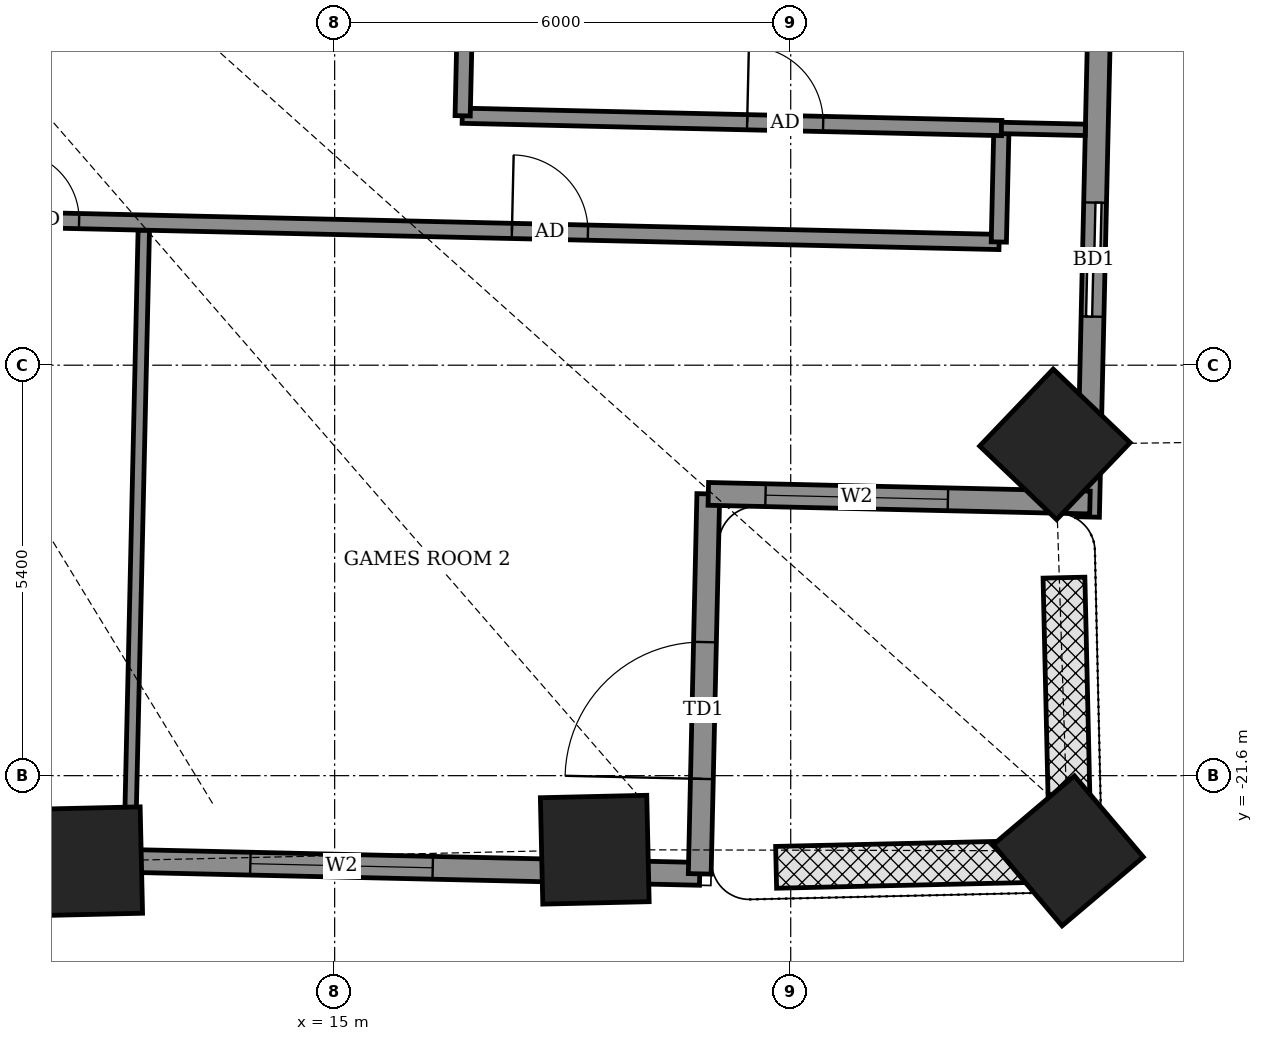
"""IFC4 building model, lengths in metres.
Left out: names, types, materials, properties, quantities, classifications, styles, units other than length and angle.
Written with IfcOpenShell. Run it as: python <this file> out.ifc"""

import sys

from ifc_helpers import new_model, si_unit, direction, frame, frame_2d, origin, origin_2d, place, context, subcontext, project, spatial, rectangle, extrude, element, fill, save


model = new_model("IFC4")
c1 = context("Model", 3, precision=1e-05, world=origin(), true_north=direction((0.0, 1.0)))
c2 = subcontext(c1, "Body", "Model", "MODEL_VIEW")
j1 = project(units=[si_unit("LENGTHUNIT", "METRE"), si_unit("PLANEANGLEUNIT", "RADIAN")], contexts=[c1])
p1 = place(None, origin())
s1 = spatial("IfcSite", under=j1, at=p1, CompositionType="ELEMENT")
p2 = place(p1, origin())
s2 = spatial("IfcBuilding", under=s1, at=p2, CompositionType="ELEMENT")
p3 = place(p2, frame((0.0, 0.0, 97.3)))
s3 = spatial("IfcBuildingStorey", under=s2, at=p3, CompositionType="ELEMENT", Elevation=97.3)
for number, where, z_axis, x_axis in (
    (1, (11.757, -22.726, -0.55), (0.0, 0.0, 1.0), (1.0, 0.023, 0.0)),
    (2, (18.422, -22.574, -0.55), (0.0, 0.0, 1.0), (1.0, 0.023, 0.0)),
    (3, (24.651, -22.589, -0.55), (0.0, 0.0, 1.0), (0.763, 0.647, 0.0)),
    (4, (24.476, -17.241, -0.55), (0.0, 0.0, 1.0), (0.691, 0.723, 0.0)),
):
    element("IfcColumn", number, at=place(p3, frame(where, z_axis=z_axis, x_axis=x_axis)), inside=s3, PredefinedType="COLUMN", context=c2, shape_type="SweptSolid", body=[
        extrude(rectangle(XDim=1.4, YDim=1.4, at=origin_2d()), origin(), (0.0, 0.0, 1.0), 4.6),
    ])
p4 = place(p3, frame((24.911, -18.197, 0.0), z_axis=(0.0, 0.0, 1.0), x_axis=(0.022624958127, 0.999744022873, 0.0)))
e5 = element("IfcWall", 5, at=p4, inside=s3, PredefinedType="SOLIDWALL", context=c2, shape_type="SweptSolid", body=[
    extrude(rectangle(XDim=12.42, YDim=0.3, at=frame_2d((6.21, 0.0))), origin(), (0.0, 0.0, 1.0), 2.85),
])
p5 = place(p4, frame((2.637, 0.0, 0.0)))
e6 = element("IfcOpeningElement", 6, at=p5, cuts=e5, PredefinedType="OPENING", context=c2, shape_type="SweptSolid", body=[
    extrude(rectangle(XDim=1.5, YDim=2.4, at=frame_2d((0.75, 1.2))), frame((0.0, 0.16, 0.0), z_axis=(0.0, -1.0, 0.0), x_axis=(1.0, 0.0, 0.0)), (0.0, 0.0, 1.0), 0.32),
])
p6 = place(p4, frame((6.411, 0.0, 0.9)))
e7 = element("IfcOpeningElement", 7, at=p6, cuts=e5, PredefinedType="OPENING", context=c2, shape_type="SweptSolid", body=[
    extrude(rectangle(XDim=2.4, YDim=1.5, at=frame_2d((1.2, 0.75))), frame((0.0, 0.16, 0.0), z_axis=(0.0, -1.0, 0.0), x_axis=(1.0, 0.0, 0.0)), (0.0, 0.0, 1.0), 0.32),
])
p7 = place(p3, frame((-24.894, -21.878, 0.0), z_axis=(0.0, 0.0, 1.0), x_axis=(0.999742689045, -0.022683820265, 0.0)))
e8 = element("IfcWall", 8, at=p7, inside=s3, PredefinedType="SOLIDWALL", context=c2, shape_type="SweptSolid", body=[
    extrude(rectangle(XDim=44.708, YDim=0.3, at=frame_2d((22.354, 0.0))), origin(), (0.0, 0.0, 1.0), 2.45),
])
p8 = place(p7, frame((0.698, 0.0, 0.0)))
e9 = element("IfcOpeningElement", 9, at=p8, cuts=e8, PredefinedType="OPENING", context=c2, shape_type="SweptSolid", body=[
    extrude(rectangle(XDim=1.5, YDim=2.4, at=frame_2d((0.75, 1.2))), frame((0.0, 0.16, 0.0), z_axis=(0.0, -1.0, 0.0), x_axis=(1.0, 0.0, 0.0)), (0.0, 0.0, 1.0), 0.32),
])
p9 = place(p7, frame((6.543, 0.0, 0.9)))
e10 = element("IfcOpeningElement", 10, at=p9, cuts=e8, PredefinedType="OPENING", context=c2, shape_type="SweptSolid", body=[
    extrude(rectangle(XDim=2.4, YDim=1.5, at=frame_2d((1.2, 0.75))), frame((0.0, 0.16, 0.0), z_axis=(0.0, -1.0, 0.0), x_axis=(1.0, 0.0, 0.0)), (0.0, 0.0, 1.0), 0.32),
])
p10 = place(p7, frame((18.48, 0.0, 0.9)))
e11 = element("IfcOpeningElement", 11, at=p10, cuts=e8, PredefinedType="OPENING", context=c2, shape_type="SweptSolid", body=[
    extrude(rectangle(XDim=2.4, YDim=1.5, at=frame_2d((1.2, 0.75))), frame((0.0, 0.16, 0.0), z_axis=(0.0, -1.0, 0.0), x_axis=(1.0, 0.0, 0.0)), (0.0, 0.0, 1.0), 0.32),
])
p11 = place(p7, frame((24.76, 0.0, 0.0)))
e12 = element("IfcOpeningElement", 12, at=p11, cuts=e8, PredefinedType="OPENING", context=c2, shape_type="SweptSolid", body=[
    extrude(rectangle(XDim=1.5, YDim=2.4, at=frame_2d((0.75, 1.2))), frame((0.0, 0.16, 0.0), z_axis=(0.0, -1.0, 0.0), x_axis=(1.0, 0.0, 0.0)), (0.0, 0.0, 1.0), 0.32),
])
p12 = place(p7, frame((27.61, 0.0, 0.0)))
e13 = element("IfcOpeningElement", 13, at=p12, cuts=e8, PredefinedType="OPENING", context=c2, shape_type="SweptSolid", body=[
    extrude(rectangle(XDim=1.5, YDim=2.4, at=frame_2d((0.75, 1.2))), frame((0.0, 0.16, 0.0), z_axis=(0.0, -1.0, 0.0), x_axis=(1.0, 0.0, 0.0)), (0.0, 0.0, 1.0), 0.32),
])
p13 = place(p7, frame((33.44, 0.0, 0.0)))
e14 = element("IfcOpeningElement", 14, at=p13, cuts=e8, PredefinedType="OPENING", context=c2, shape_type="SweptSolid", body=[
    extrude(rectangle(XDim=1.5, YDim=2.4, at=frame_2d((0.75, 1.2))), frame((0.0, 0.16, 0.0), z_axis=(0.0, -1.0, 0.0), x_axis=(1.0, 0.0, 0.0)), (0.0, 0.0, 1.0), 0.32),
])
p14 = place(p7, frame((38.795, 0.0, 0.9)))
e15 = element("IfcOpeningElement", 15, at=p14, cuts=e8, PredefinedType="OPENING", context=c2, shape_type="SweptSolid", body=[
    extrude(rectangle(XDim=2.4, YDim=1.5, at=frame_2d((1.2, 0.75))), frame((0.0, 0.16, 0.0), z_axis=(0.0, -1.0, 0.0), x_axis=(1.0, 0.0, 0.0)), (0.0, 0.0, 1.0), 0.32),
])
p15 = place(p3, frame((19.803, -22.892, 0.0), z_axis=(0.0, 0.0, 1.0), x_axis=(0.022606059803, 0.999744450377, 0.0)))
e16 = element("IfcWall", 16, at=p15, inside=s3, PredefinedType="SOLIDWALL", context=c2, shape_type="SweptSolid", body=[
    extrude(rectangle(XDim=5.0, YDim=0.3, at=frame_2d((2.5, 0.0))), origin(), (0.0, 0.0, 1.0), 2.45),
])
p16 = place(p15, frame((1.25, 0.0, 0.0)))
e17 = element("IfcOpeningElement", 17, at=p16, cuts=e16, PredefinedType="OPENING", context=c2, shape_type="SweptSolid", body=[
    extrude(rectangle(XDim=1.8, YDim=2.4, at=frame_2d((0.9, 1.2))), frame((0.0, 0.16, 0.0), z_axis=(0.0, -1.0, 0.0), x_axis=(1.0, 0.0, 0.0)), (0.0, 0.0, 1.0), 0.32),
])
p17 = place(p3, frame((19.916, -17.893, 0.0), z_axis=(0.0, 0.0, 1.0), x_axis=(0.99974228708, -0.022701529129, 0.0)))
e18 = element("IfcWall", 18, at=p17, inside=s3, PredefinedType="SOLIDWALL", context=c2, shape_type="SweptSolid", body=[
    extrude(rectangle(XDim=5.022, YDim=0.3, at=frame_2d((2.511, 0.0))), origin(), (0.0, 0.0, 1.0), 2.45),
])
p18 = place(p17, frame((0.753, 0.0, 0.9)))
e19 = element("IfcOpeningElement", 19, at=p18, cuts=e18, PredefinedType="OPENING", context=c2, shape_type="SweptSolid", body=[
    extrude(rectangle(XDim=2.4, YDim=1.5, at=frame_2d((1.2, 0.75))), frame((0.0, 0.16, 0.0), z_axis=(0.0, -1.0, 0.0), x_axis=(1.0, 0.0, 0.0)), (0.0, 0.0, 1.0), 0.32),
])
p19 = place(p3, frame((24.595, -18.995, 0.0), z_axis=(0.0, 0.0, 1.0), x_axis=(0.022790544321, -0.999740261813, 0.0)))
e20 = element("IfcWall", 20, at=p19, inside=s3, PredefinedType="USERDEFINED", context=c2, shape_type="SweptSolid", body=[
    extrude(rectangle(XDim=3.289, YDim=0.55, at=frame_2d((1.644, 0.0))), origin(), (0.0, 0.0, 1.0), 0.8),
])
p20 = place(p3, frame((24.245, -22.728, 0.0), z_axis=(0.0, 0.0, 1.0), x_axis=(-0.99974337306, -0.022653653644, 0.0)))
e21 = element("IfcWall", 21, at=p20, inside=s3, PredefinedType="USERDEFINED", context=c2, shape_type="SweptSolid", body=[
    extrude(rectangle(XDim=3.438, YDim=0.55, at=frame_2d((1.719, 0.0))), origin(), (0.0, 0.0, 1.0), 0.8),
])
p21 = place(p3, frame((12.304, -22.572, 0.0), z_axis=(0.0, 0.0, 1.0), x_axis=(0.022706435224, 0.999742175663, 0.0)))
e22 = element("IfcWall", 22, at=p21, inside=s3, PredefinedType="PARTITIONING", context=c2, shape_type="SweptSolid", body=[
    extrude(rectangle(XDim=8.15, YDim=0.15, at=frame_2d((4.075, 0.0))), origin(), (0.0, 0.0, 1.0), 2.65),
])
p22 = place(p3, frame((-24.332, -13.488, 0.0), z_axis=(0.0, 0.0, 1.0), x_axis=(0.999742555853, -0.022689689667, 0.0)))
e23 = element("IfcWall", 23, at=p22, inside=s3, PredefinedType="PARTITIONING", context=c2, shape_type="SweptSolid", body=[
    extrude(rectangle(XDim=48.086, YDim=0.2, at=frame_2d((24.043, 0.0))), origin(), (0.0, 0.0, 1.0), 2.45),
])
p23 = place(p22, frame((0.2, 0.0, 0.0)))
e24 = element("IfcOpeningElement", 24, at=p23, cuts=e23, PredefinedType="OPENING", context=c2, shape_type="SweptSolid", body=[
    extrude(rectangle(XDim=1.0, YDim=2.1, at=frame_2d((0.5, 1.05))), frame((0.0, 0.11, 0.0), z_axis=(0.0, -1.0, 0.0), x_axis=(1.0, 0.0, 0.0)), (0.0, 0.0, 1.0), 0.22),
])
p24 = place(p22, frame((3.879, 0.0, 0.0)))
e25 = element("IfcOpeningElement", 25, at=p24, cuts=e23, PredefinedType="OPENING", context=c2, shape_type="SweptSolid", body=[
    extrude(rectangle(XDim=0.9, YDim=2.1, at=frame_2d((0.45, 1.05))), frame((0.0, 0.11, 0.0), z_axis=(0.0, -1.0, 0.0), x_axis=(1.0, 0.0, 0.0)), (0.0, 0.0, 1.0), 0.22),
])
p25 = place(p22, frame((8.929, 0.0, 0.0)))
e26 = element("IfcOpeningElement", 26, at=p25, cuts=e23, PredefinedType="OPENING", context=c2, shape_type="SweptSolid", body=[
    extrude(rectangle(XDim=1.0, YDim=2.1, at=frame_2d((0.5, 1.05))), frame((0.0, 0.11, 0.0), z_axis=(0.0, -1.0, 0.0), x_axis=(1.0, 0.0, 0.0)), (0.0, 0.0, 1.0), 0.22),
])
p26 = place(p22, frame((17.004, 0.0, 0.0)))
e27 = element("IfcOpeningElement", 27, at=p26, cuts=e23, PredefinedType="OPENING", context=c2, shape_type="SweptSolid", body=[
    extrude(rectangle(XDim=1.0, YDim=2.1, at=frame_2d((0.5, 1.05))), frame((0.0, 0.11, 0.0), z_axis=(0.0, -1.0, 0.0), x_axis=(1.0, 0.0, 0.0)), (0.0, 0.0, 1.0), 0.22),
])
p27 = place(p22, frame((25.054, 0.0, 0.0)))
e28 = element("IfcOpeningElement", 28, at=p27, cuts=e23, PredefinedType="OPENING", context=c2, shape_type="SweptSolid", body=[
    extrude(rectangle(XDim=0.9, YDim=2.1, at=frame_2d((0.45, 1.05))), frame((0.0, 0.11, 0.0), z_axis=(0.0, -1.0, 0.0), x_axis=(1.0, 0.0, 0.0)), (0.0, 0.0, 1.0), 0.22),
])
p28 = place(p22, frame((27.679, 0.0, 0.0)))
e29 = element("IfcOpeningElement", 29, at=p28, cuts=e23, PredefinedType="OPENING", context=c2, shape_type="SweptSolid", body=[
    extrude(rectangle(XDim=0.9, YDim=2.1, at=frame_2d((0.45, 1.05))), frame((0.0, 0.11, 0.0), z_axis=(0.0, -1.0, 0.0), x_axis=(1.0, 0.0, 0.0)), (0.0, 0.0, 1.0), 0.22),
])
p29 = place(p22, frame((35.079, 0.0, 0.0)))
e30 = element("IfcOpeningElement", 30, at=p29, cuts=e23, PredefinedType="OPENING", context=c2, shape_type="SweptSolid", body=[
    extrude(rectangle(XDim=0.9, YDim=2.1, at=frame_2d((0.45, 1.05))), frame((0.0, 0.11, 0.0), z_axis=(0.0, -1.0, 0.0), x_axis=(1.0, 0.0, 0.0)), (0.0, 0.0, 1.0), 0.22),
])
p30 = place(p22, frame((41.675, 0.0, 0.0)))
e31 = element("IfcOpeningElement", 31, at=p30, cuts=e23, PredefinedType="OPENING", context=c2, shape_type="SweptSolid", body=[
    extrude(rectangle(XDim=1.0, YDim=2.1, at=frame_2d((0.5, 1.05))), frame((0.0, 0.11, 0.0), z_axis=(0.0, -1.0, 0.0), x_axis=(1.0, 0.0, 0.0)), (0.0, 0.0, 1.0), 0.22),
])
p31 = place(p3, frame((23.738, -14.579, 0.0), z_axis=(0.0, 0.0, 1.0), x_axis=(0.022617910375, 0.999744182344, 0.0)))
e32 = element("IfcWall", 32, at=p31, inside=s3, PredefinedType="PARTITIONING", context=c2, shape_type="SweptSolid", body=[
    extrude(rectangle(XDim=1.5, YDim=0.2, at=frame_2d((0.75, 0.0))), origin(), (0.0, 0.0, 1.0), 4.05),
])
p32 = place(p3, frame((16.679, -12.918, 0.0), z_axis=(0.0, 0.0, 1.0), x_axis=(0.999739218926, -0.02283624622, 0.0)))
e33 = element("IfcWall", 33, at=p32, inside=s3, PredefinedType="PARTITIONING", context=c2, shape_type="SweptSolid", body=[
    extrude(rectangle(XDim=7.099, YDim=0.2, at=frame_2d((3.549, 0.0))), origin(), (0.0, 0.0, 1.0), 4.05),
])
p33 = place(p32, frame((3.749, 0.0, 0.0)))
e34 = element("IfcOpeningElement", 34, at=p33, cuts=e33, PredefinedType="OPENING", context=c2, shape_type="SweptSolid", body=[
    extrude(rectangle(XDim=1.0, YDim=2.1, at=frame_2d((0.5, 1.05))), frame((0.0, 0.11, 0.0), z_axis=(0.0, -1.0, 0.0), x_axis=(1.0, 0.0, 0.0)), (0.0, 0.0, 1.0), 0.22),
])
p34 = place(p3, frame((16.684, -12.919, 0.0), z_axis=(0.0, 0.0, 1.0), x_axis=(0.022667483124, 0.999743059595, 0.0)))
e35 = element("IfcWall", 35, at=p34, inside=s3, PredefinedType="PARTITIONING", context=c2, shape_type="SweptSolid", body=[
    extrude(rectangle(XDim=5.245, YDim=0.2, at=frame_2d((2.623, 0.0))), origin(), (0.0, 0.0, 1.0), 4.05),
])
p35 = place(p3, frame((23.772, -13.079, 0.0), z_axis=(0.0, 0.0, 1.0), x_axis=(0.999745701647, -0.022550654924, 0.0)))
e36 = element("IfcWall", 36, at=p35, inside=s3, PredefinedType="PARTITIONING", context=c2, shape_type="SweptSolid", body=[
    extrude(rectangle(XDim=1.104, YDim=0.15, at=frame_2d((0.552, 0.0))), origin(), (0.0, 0.0, 1.0), 4.05),
])
p36 = place(p5, origin())
e37 = element("IfcDoor", 37, at=p36, inside=s3, OperationType="SLIDING_TO_LEFT", PredefinedType="DOOR", context=c2, shape_type="SweptSolid", body=[
    extrude(rectangle(XDim=1.5, YDim=2.4, at=frame_2d((0.75, 1.2))), frame((0.0, 0.025, 0.0), z_axis=(0.0, -1.0, 0.0), x_axis=(1.0, 0.0, 0.0)), (0.0, 0.0, 1.0), 0.05),
])
fill(e6, e37)
p37 = place(p14, origin())
e38 = element("IfcWindow", 38, at=p37, inside=s3, PartitioningType="DOUBLE_PANEL_VERTICAL", PredefinedType="WINDOW", context=c2, shape_type="SweptSolid", body=[
    extrude(rectangle(XDim=2.4, YDim=1.5, at=frame_2d((1.2, 0.75))), frame((0.0, 0.03, 0.0), z_axis=(0.0, -1.0, 0.0), x_axis=(1.0, 0.0, 0.0)), (0.0, 0.0, 1.0), 0.06),
])
fill(e15, e38)
p38 = place(p16, origin())
e39 = element("IfcDoor", 39, at=p38, inside=s3, OperationType="DOUBLE_DOOR_SINGLE_SWING", PredefinedType="DOOR", context=c2, shape_type="SweptSolid", body=[
    extrude(rectangle(XDim=1.8, YDim=2.4, at=frame_2d((0.9, 1.2))), frame((0.0, 0.025, 0.0), z_axis=(0.0, -1.0, 0.0), x_axis=(1.0, 0.0, 0.0)), (0.0, 0.0, 1.0), 0.05),
])
fill(e17, e39)
p39 = place(p18, origin())
e40 = element("IfcWindow", 40, at=p39, inside=s3, PartitioningType="DOUBLE_PANEL_VERTICAL", PredefinedType="WINDOW", context=c2, shape_type="SweptSolid", body=[
    extrude(rectangle(XDim=2.4, YDim=1.5, at=frame_2d((1.2, 0.75))), frame((0.0, 0.03, 0.0), z_axis=(0.0, -1.0, 0.0), x_axis=(1.0, 0.0, 0.0)), (0.0, 0.0, 1.0), 0.06),
])
fill(e19, e40)
p40 = place(p29, origin())
e41 = element("IfcDoor", 41, at=p40, inside=s3, OperationType="SINGLE_SWING_LEFT", PredefinedType="DOOR", context=c2, shape_type="SweptSolid", body=[
    extrude(rectangle(XDim=0.9, YDim=2.1, at=frame_2d((0.45, 1.05))), frame((0.0, 0.025, 0.0), z_axis=(0.0, -1.0, 0.0), x_axis=(1.0, 0.0, 0.0)), (0.0, 0.0, 1.0), 0.05),
])
fill(e30, e41)
p41 = place(p30, origin())
e42 = element("IfcDoor", 42, at=p41, inside=s3, OperationType="SINGLE_SWING_RIGHT", PredefinedType="DOOR", context=c2, shape_type="SweptSolid", body=[
    extrude(rectangle(XDim=1.0, YDim=2.1, at=frame_2d((0.5, 1.05))), frame((0.0, 0.025, 0.0), z_axis=(0.0, -1.0, 0.0), x_axis=(1.0, 0.0, 0.0)), (0.0, 0.0, 1.0), 0.05),
])
fill(e31, e42)
p42 = place(p33, origin())
e43 = element("IfcDoor", 43, at=p42, inside=s3, OperationType="SINGLE_SWING_LEFT", PredefinedType="DOOR", context=c2, shape_type="SweptSolid", body=[
    extrude(rectangle(XDim=1.0, YDim=2.1, at=frame_2d((0.5, 1.05))), frame((0.0, 0.025, 0.0), z_axis=(0.0, -1.0, 0.0), x_axis=(1.0, 0.0, 0.0)), (0.0, 0.0, 1.0), 0.05),
])
fill(e34, e43)
save(model, sys.argv[1])
